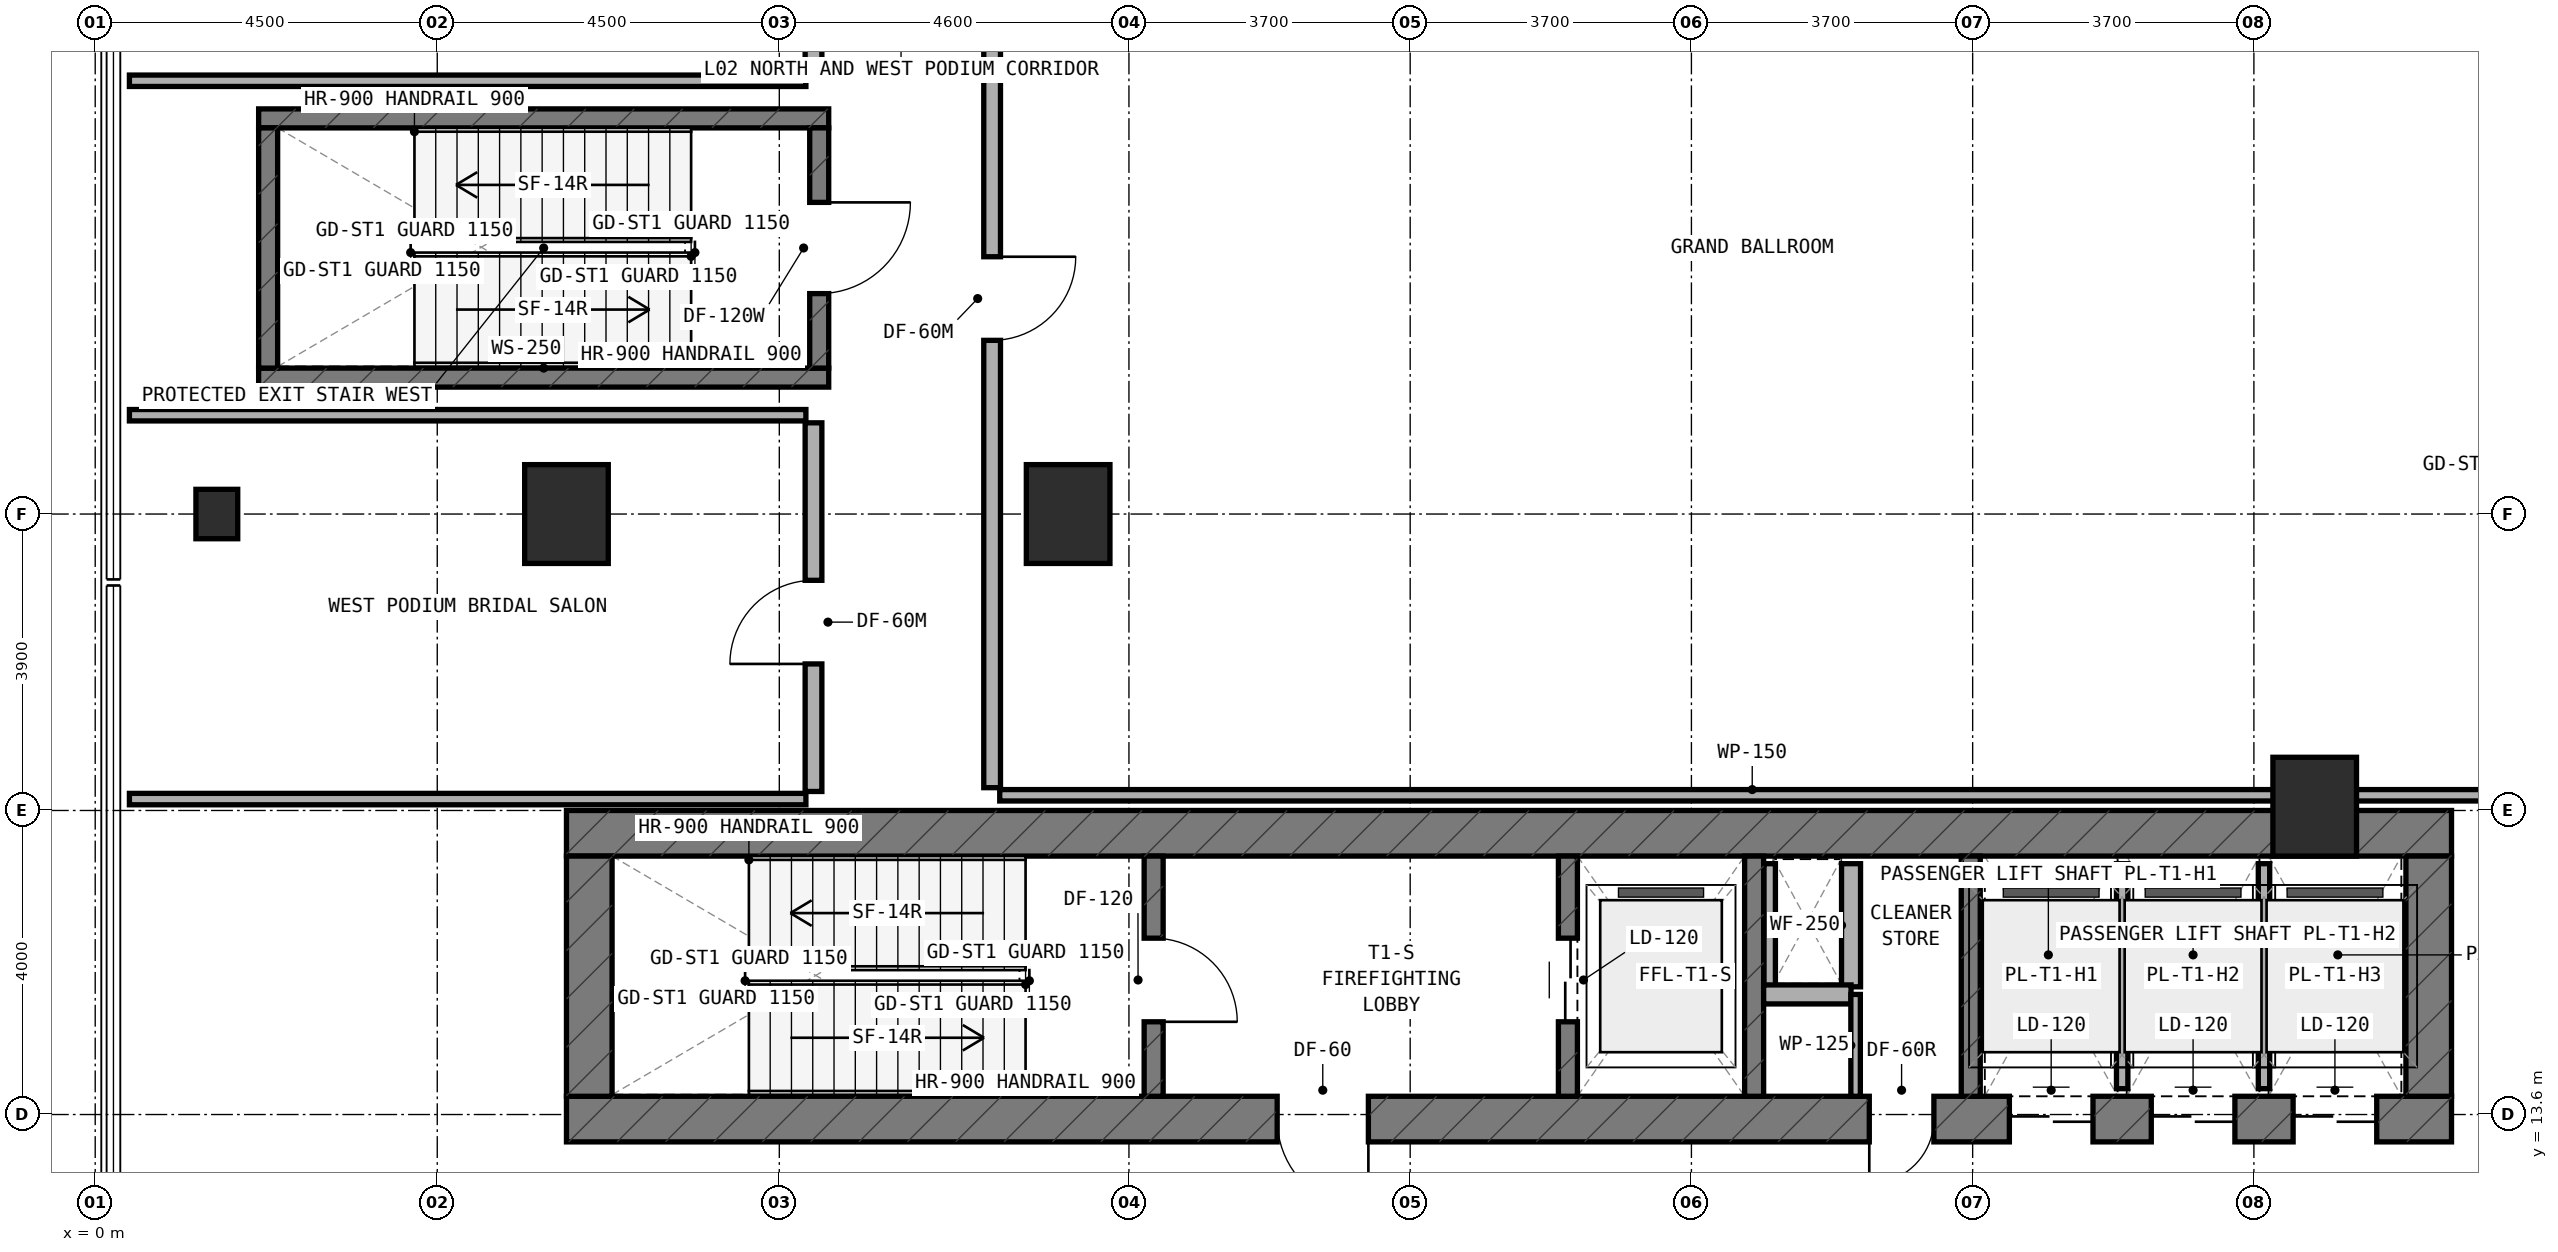
"""IFC4 building model, lengths in metres.
Left out: names, types, materials, properties, quantities, classifications, styles, units other than length and angle.
Written with IfcOpenShell. Run it as: python <this file> out.ifc"""

import sys

from ifc_helpers import new_model, si_unit, direction, frame, frame_2d, origin, origin_2d, place, context, subcontext, project, spatial, rectangle, extrude, element, fill, save


model = new_model("IFC4")
c1 = context("Model", 3, precision=1e-05, world=origin(), true_north=direction((0.0, 1.0)))
c2 = subcontext(c1, "Body", "Model", "MODEL_VIEW")
j1 = project(units=[si_unit("LENGTHUNIT", "METRE"), si_unit("PLANEANGLEUNIT", "RADIAN")], contexts=[c1])
p1 = place(None, origin())
s1 = spatial("IfcSite", under=j1, at=p1, CompositionType="ELEMENT")
p2 = place(p1, origin())
s2 = spatial("IfcBuilding", under=s1, at=p2, CompositionType="ELEMENT")
p3 = place(p2, frame((0.0, 0.0, 10.2)))
s3 = spatial("IfcBuildingStorey", under=s2, at=p3, CompositionType="ELEMENT", Elevation=10.2)
p4 = place(p3, frame((6.2, 13.54, 0.0), z_axis=(0.0, 0.0, 1.0), x_axis=(1.0, 0.0, 0.0)))
e1 = element("IfcWall", 1, at=p4, inside=s3, PredefinedType="SHEAR", context=c2, shape_type="SweptSolid", body=[
    extrude(rectangle(XDim=24.8, YDim=0.6, at=frame_2d((12.4, 0.0))), origin(), (0.0, 0.0, 1.0), 4.8),
])
p5 = place(p4, frame((9.35, 0.0, 0.0)))
e2 = element("IfcOpeningElement", 2, at=p5, cuts=e1, PredefinedType="OPENING", context=c2, shape_type="SweptSolid", body=[
    extrude(rectangle(XDim=1.2, YDim=2.15, at=frame_2d((0.6, 1.075))), frame((0.0, 0.31, 0.0), z_axis=(0.0, -1.0, 0.0), x_axis=(1.0, 0.0, 0.0)), (0.0, 0.0, 1.0), 0.62),
])
p6 = place(p4, frame((17.14, 0.0, 0.0)))
e3 = element("IfcOpeningElement", 3, at=p6, cuts=e1, PredefinedType="OPENING", context=c2, shape_type="SweptSolid", body=[
    extrude(rectangle(XDim=0.85, YDim=2.1, at=frame_2d((0.425, 1.05))), frame((0.0, 0.31, 0.0), z_axis=(0.0, -1.0, 0.0), x_axis=(1.0, 0.0, 0.0)), (0.0, 0.0, 1.0), 0.62),
])
p7 = place(p4, frame((18.983, 0.0, 0.0)))
e4 = element("IfcOpeningElement", 4, at=p7, cuts=e1, PredefinedType="OPENING", context=c2, shape_type="SweptSolid", body=[
    extrude(rectangle(XDim=1.1, YDim=2.15, at=frame_2d((0.55, 1.075))), frame((0.0, 0.31, 0.0), z_axis=(0.0, -1.0, 0.0), x_axis=(1.0, 0.0, 0.0)), (0.0, 0.0, 1.0), 0.62),
])
p8 = place(p4, frame((20.85, 0.0, 0.0)))
e5 = element("IfcOpeningElement", 5, at=p8, cuts=e1, PredefinedType="OPENING", context=c2, shape_type="SweptSolid", body=[
    extrude(rectangle(XDim=1.1, YDim=2.15, at=frame_2d((0.55, 1.075))), frame((0.0, 0.31, 0.0), z_axis=(0.0, -1.0, 0.0), x_axis=(1.0, 0.0, 0.0)), (0.0, 0.0, 1.0), 0.62),
])
p9 = place(p4, frame((22.716, 0.0, 0.0)))
e6 = element("IfcOpeningElement", 6, at=p9, cuts=e1, PredefinedType="OPENING", context=c2, shape_type="SweptSolid", body=[
    extrude(rectangle(XDim=1.1, YDim=2.15, at=frame_2d((0.55, 1.075))), frame((0.0, 0.31, 0.0), z_axis=(0.0, -1.0, 0.0), x_axis=(1.0, 0.0, 0.0)), (0.0, 0.0, 1.0), 0.62),
])
p10 = place(p3, frame((6.2, 17.3, 0.0), z_axis=(0.0, 0.0, 1.0), x_axis=(1.0, 0.0, 0.0)))
e7 = element("IfcWall", 7, at=p10, inside=s3, PredefinedType="SHEAR", context=c2, shape_type="SweptSolid", body=[
    extrude(rectangle(XDim=24.8, YDim=0.6, at=frame_2d((12.4, 0.0))), origin(), (0.0, 0.0, 1.0), 4.8),
])
for number, where, z_axis, x_axis in (
    (8, (6.5, 13.84, 0.0), (0.0, 0.0, 1.0), (0.0, 1.0, 0.0)),
    (9, (30.7, 13.84, 0.0), (0.0, 0.0, 1.0), (0.0, 1.0, 0.0)),
):
    element("IfcWall", number, at=place(p3, frame(where, z_axis=z_axis, x_axis=x_axis)), inside=s3, PredefinedType="SHEAR", context=c2, shape_type="SweptSolid", body=[
        extrude(rectangle(XDim=3.16, YDim=0.6, at=frame_2d((1.58, 0.0))), origin(), (0.0, 0.0, 1.0), 4.8),
    ])
p11 = place(p3, frame((13.925, 13.84, 0.0), z_axis=(0.0, 0.0, 1.0), x_axis=(0.0, 1.0, 0.0)))
e10 = element("IfcWall", 10, at=p11, inside=s3, PredefinedType="STANDARD", context=c2, shape_type="SweptSolid", body=[
    extrude(rectangle(XDim=3.16, YDim=0.25, at=frame_2d((1.58, 0.0))), origin(), (0.0, 0.0, 1.0), 4.45),
])
p12 = place(p11, frame((0.98, 0.0, 0.0)))
e11 = element("IfcOpeningElement", 11, at=p12, cuts=e10, PredefinedType="OPENING", context=c2, shape_type="SweptSolid", body=[
    extrude(rectangle(XDim=1.1, YDim=2.15, at=frame_2d((0.55, 1.075))), frame((0.0, 0.135, 0.0), z_axis=(0.0, -1.0, 0.0), x_axis=(1.0, 0.0, 0.0)), (0.0, 0.0, 1.0), 0.27),
])
p13 = place(p3, frame((19.375, 13.84, 0.0), z_axis=(0.0, 0.0, 1.0), x_axis=(0.0, 1.0, 0.0)))
e12 = element("IfcWall", 12, at=p13, inside=s3, PredefinedType="STANDARD", context=c2, shape_type="SweptSolid", body=[
    extrude(rectangle(XDim=3.16, YDim=0.25, at=frame_2d((1.58, 0.0))), origin(), (0.0, 0.0, 1.0), 4.45),
])
p14 = place(p13, frame((0.98, 0.0, 0.0)))
e13 = element("IfcOpeningElement", 13, at=p14, cuts=e12, PredefinedType="OPENING", context=c2, shape_type="SweptSolid", body=[
    extrude(rectangle(XDim=1.1, YDim=2.15, at=frame_2d((0.55, 1.075))), frame((0.0, 0.135, 0.0), z_axis=(0.0, -1.0, 0.0), x_axis=(1.0, 0.0, 0.0)), (0.0, 0.0, 1.0), 0.27),
])
for number, where, z_axis, x_axis in (
    (14, (21.825, 13.84, 0.0), (0.0, 0.0, 1.0), (0.0, 1.0, 0.0)),
    (15, (24.675, 13.84, 0.0), (0.0, 0.0, 1.0), (0.0, 1.0, 0.0)),
):
    element("IfcWall", number, at=place(p3, frame(where, z_axis=z_axis, x_axis=x_axis)), inside=s3, PredefinedType="STANDARD", context=c2, shape_type="SweptSolid", body=[
        extrude(rectangle(XDim=3.16, YDim=0.25, at=frame_2d((1.58, 0.0))), origin(), (0.0, 0.0, 1.0), 4.45),
    ])
for number, where, z_axis, x_axis in (
    (16, (2.15, 23.295, 0.0), (0.0, 0.0, 1.0), (1.0, 0.0, 0.0)),
    (17, (2.15, 26.705, 0.0), (0.0, 0.0, 1.0), (1.0, 0.0, 0.0)),
):
    element("IfcWall", number, at=place(p3, frame(where, z_axis=z_axis, x_axis=x_axis)), inside=s3, PredefinedType="STANDARD", context=c2, shape_type="SweptSolid", body=[
        extrude(rectangle(XDim=7.5, YDim=0.25, at=frame_2d((3.75, 0.0))), origin(), (0.0, 0.0, 1.0), 4.8),
    ])
p15 = place(p3, frame((2.275, 23.42, 0.0), z_axis=(0.0, 0.0, 1.0), x_axis=(0.0, 1.0, 0.0)))
e18 = element("IfcWall", 18, at=p15, inside=s3, PredefinedType="STANDARD", context=c2, shape_type="SweptSolid", body=[
    extrude(rectangle(XDim=3.16, YDim=0.25, at=frame_2d((1.58, 0.0))), origin(), (0.0, 0.0, 1.0), 4.8),
])
p16 = place(p3, frame((9.525, 23.42, 0.0), z_axis=(0.0, 0.0, 1.0), x_axis=(0.0, 1.0, 0.0)))
e19 = element("IfcWall", 19, at=p16, inside=s3, PredefinedType="STANDARD", context=c2, shape_type="SweptSolid", body=[
    extrude(rectangle(XDim=3.16, YDim=0.25, at=frame_2d((1.58, 0.0))), origin(), (0.0, 0.0, 1.0), 4.8),
])
p17 = place(p16, frame((0.98, 0.0, 0.0)))
e20 = element("IfcOpeningElement", 20, at=p17, cuts=e19, PredefinedType="OPENING", context=c2, shape_type="SweptSolid", body=[
    extrude(rectangle(XDim=1.2, YDim=2.15, at=frame_2d((0.6, 1.075))), frame((0.0, 0.135, 0.0), z_axis=(0.0, -1.0, 0.0), x_axis=(1.0, 0.0, 0.0)), (0.0, 0.0, 1.0), 0.27),
])
for number, where, z_axis, x_axis in (
    (21, (6.2, 21.5, 0.0), (0.0, 0.0, 1.0), (1.0, 0.0, 0.0)),
    (22, (12.8, 21.5, 0.0), (0.0, 0.0, 1.0), (1.0, 0.0, 0.0)),
    (23, (29.2, 17.65, 0.0), (0.0, 0.0, 1.0), (1.0, 0.0, 0.0)),
):
    element("IfcColumn", number, at=place(p3, frame(where, z_axis=z_axis, x_axis=x_axis)), inside=s3, PredefinedType="COLUMN", context=c2, shape_type="SweptSolid", body=[
        extrude(rectangle(XDim=1.1, YDim=1.3, at=origin_2d()), origin(), (0.0, 0.0, 1.0), 4.8),
    ])
p18 = place(p3, frame((1.6, 21.5, 0.0), z_axis=(0.0, 0.0, 1.0), x_axis=(1.0, 0.0, 0.0)))
e24 = element("IfcColumn", 24, at=p18, inside=s3, PredefinedType="PILASTER", context=c2, shape_type="SweptSolid", body=[
    extrude(rectangle(XDim=0.55, YDim=0.65, at=origin_2d()), origin(), (0.0, 0.0, 1.0), 4.8),
])
p19 = place(p3, frame((22.03, 15.28, 0.0), z_axis=(0.0, 0.0, 1.0), x_axis=(0.0, 1.0, 0.0)))
e25 = element("IfcWall", 25, at=p19, inside=s3, PredefinedType="PARTITIONING", context=c2, shape_type="SweptSolid", body=[
    extrude(rectangle(XDim=1.62, YDim=0.15, at=frame_2d((0.81, 0.0))), origin(), (0.0, 0.0, 1.0), 4.45),
])
p20 = place(p3, frame((23.1, 15.28, 0.0), z_axis=(0.0, 0.0, 1.0), x_axis=(0.0, 1.0, 0.0)))
e26 = element("IfcWall", 26, at=p20, inside=s3, PredefinedType="SOLIDWALL", context=c2, shape_type="SweptSolid", body=[
    extrude(rectangle(XDim=1.62, YDim=0.25, at=frame_2d((0.81, 0.0))), origin(), (0.0, 0.0, 1.0), 4.45),
])
p21 = place(p3, frame((21.95, 15.18, 0.0), z_axis=(0.0, 0.0, 1.0), x_axis=(1.0, 0.0, 0.0)))
e27 = element("IfcWall", 27, at=p21, inside=s3, PredefinedType="SOLIDWALL", context=c2, shape_type="SweptSolid", body=[
    extrude(rectangle(XDim=1.15, YDim=0.25, at=frame_2d((0.575, 0.0))), origin(), (0.0, 0.0, 1.0), 4.45),
])
p22 = place(p3, frame((23.16, 13.84, 0.0), z_axis=(0.0, 0.0, 1.0), x_axis=(0.0, 1.0, 0.0)))
e28 = element("IfcWall", 28, at=p22, inside=s3, PredefinedType="PARTITIONING", context=c2, shape_type="SweptSolid", body=[
    extrude(rectangle(XDim=1.34, YDim=0.125, at=frame_2d((0.67, 0.0))), origin(), (0.0, 0.0, 1.0), 4.45),
])
p23 = place(p3, frame((26.667, 13.94, 0.0), z_axis=(0.0, 0.0, 1.0), x_axis=(0.0, 1.0, 0.0)))
e29 = element("IfcWall", 29, at=p23, inside=s3, PredefinedType="PARTITIONING", context=c2, shape_type="SweptSolid", body=[
    extrude(rectangle(XDim=2.96, YDim=0.15, at=frame_2d((1.48, 0.0))), origin(), (0.0, 0.0, 1.0), 4.45),
])
p24 = place(p3, frame((28.533, 13.94, 0.0), z_axis=(0.0, 0.0, 1.0), x_axis=(0.0, 1.0, 0.0)))
e30 = element("IfcWall", 30, at=p24, inside=s3, PredefinedType="PARTITIONING", context=c2, shape_type="SweptSolid", body=[
    extrude(rectangle(XDim=2.96, YDim=0.15, at=frame_2d((1.48, 0.0))), origin(), (0.0, 0.0, 1.0), 3.525),
])
p25 = place(p3, frame((11.9, 17.8, 0.0), z_axis=(0.0, 0.0, 1.0), x_axis=(1.0, 0.0, 0.0)))
e31 = element("IfcWall", 31, at=p25, inside=s3, PredefinedType="PARTITIONING", context=c2, shape_type="SweptSolid", body=[
    extrude(rectangle(XDim=19.8, YDim=0.15, at=frame_2d((9.9, 0.0))), origin(), (0.0, 0.0, 1.0), 3.525),
])
p26 = place(p3, frame((11.8, 17.9, 0.0), z_axis=(0.0, 0.0, 1.0), x_axis=(0.0, 1.0, 0.0)))
e32 = element("IfcWall", 32, at=p26, inside=s3, PredefinedType="SOLIDWALL", context=c2, shape_type="SweptSolid", body=[
    extrude(rectangle(XDim=14.2, YDim=0.22, at=frame_2d((7.1, 0.0))), origin(), (0.0, 0.0, 1.0), 3.525),
])
p27 = place(p26, frame((5.885, 0.0, 0.0)))
e33 = element("IfcOpeningElement", 33, at=p27, cuts=e32, PredefinedType="OPENING", context=c2, shape_type="SweptSolid", body=[
    extrude(rectangle(XDim=1.1, YDim=2.1, at=frame_2d((0.55, 1.05))), frame((0.0, 0.12, 0.0), z_axis=(0.0, -1.0, 0.0), x_axis=(1.0, 0.0, 0.0)), (0.0, 0.0, 1.0), 0.24),
])
p28 = place(p3, frame((0.45, 17.75, 0.0), z_axis=(0.0, 0.0, 1.0), x_axis=(1.0, 0.0, 0.0)))
e34 = element("IfcWall", 34, at=p28, inside=s3, PredefinedType="PARTITIONING", context=c2, shape_type="SweptSolid", body=[
    extrude(rectangle(XDim=8.9, YDim=0.15, at=frame_2d((4.45, 0.0))), origin(), (0.0, 0.0, 1.0), 3.725),
])
p29 = place(p3, frame((0.45, 22.8, 0.0), z_axis=(0.0, 0.0, 1.0), x_axis=(1.0, 0.0, 0.0)))
e35 = element("IfcWall", 35, at=p29, inside=s3, PredefinedType="PARTITIONING", context=c2, shape_type="SweptSolid", body=[
    extrude(rectangle(XDim=8.9, YDim=0.15, at=frame_2d((4.45, 0.0))), origin(), (0.0, 0.0, 1.0), 3.925),
])
p30 = place(p3, frame((9.45, 17.85, 0.0), z_axis=(0.0, 0.0, 1.0), x_axis=(0.0, 1.0, 0.0)))
e36 = element("IfcWall", 36, at=p30, inside=s3, PredefinedType="SOLIDWALL", context=c2, shape_type="SweptSolid", body=[
    extrude(rectangle(XDim=4.85, YDim=0.22, at=frame_2d((2.425, 0.0))), origin(), (0.0, 0.0, 1.0), 3.525),
])
p31 = place(p30, frame((1.678, 0.0, 0.0)))
e37 = element("IfcOpeningElement", 37, at=p31, cuts=e36, PredefinedType="OPENING", context=c2, shape_type="SweptSolid", body=[
    extrude(rectangle(XDim=1.1, YDim=2.1, at=frame_2d((0.55, 1.05))), frame((0.0, 0.12, 0.0), z_axis=(0.0, -1.0, 0.0), x_axis=(1.0, 0.0, 0.0)), (0.0, 0.0, 1.0), 0.24),
])
p32 = place(p3, frame((0.45, 27.2, 0.0), z_axis=(0.0, 0.0, 1.0), x_axis=(1.0, 0.0, 0.0)))
e38 = element("IfcWall", 38, at=p32, inside=s3, PredefinedType="PARTITIONING", context=c2, shape_type="SweptSolid", body=[
    extrude(rectangle(XDim=8.9, YDim=0.15, at=frame_2d((4.45, 0.0))), origin(), (0.0, 0.0, 1.0), 3.925),
])
p33 = place(p3, frame((9.45, 27.3, 0.0), z_axis=(0.0, 0.0, 1.0), x_axis=(0.0, 1.0, 0.0)))
e39 = element("IfcWall", 39, at=p33, inside=s3, PredefinedType="SOLIDWALL", context=c2, shape_type="SweptSolid", body=[
    extrude(rectangle(XDim=4.85, YDim=0.22, at=frame_2d((2.425, 0.0))), origin(), (0.0, 0.0, 1.0), 3.525),
])
p34 = place(p33, frame((1.678, 0.0, 0.0)))
e40 = element("IfcOpeningElement", 40, at=p34, cuts=e39, PredefinedType="OPENING", context=c2, shape_type="SweptSolid", body=[
    extrude(rectangle(XDim=1.1, YDim=2.1, at=frame_2d((0.55, 1.05))), frame((0.0, 0.12, 0.0), z_axis=(0.0, -1.0, 0.0), x_axis=(1.0, 0.0, 0.0)), (0.0, 0.0, 1.0), 0.24),
])
p35 = place(p12, frame((1.1, 0.0, 0.0), z_axis=(0.0, 0.0, 1.0), x_axis=(-1.0, 0.0, 0.0)))
e41 = element("IfcDoor", 41, at=p35, inside=s3, OperationType="SINGLE_SWING_RIGHT", PredefinedType="DOOR", context=c2, shape_type="SweptSolid", body=[
    extrude(rectangle(XDim=1.1, YDim=2.15, at=frame_2d((0.55, 1.075))), frame((0.0, 0.025, 0.0), z_axis=(0.0, -1.0, 0.0), x_axis=(1.0, 0.0, 0.0)), (0.0, 0.0, 1.0), 0.05),
])
fill(e11, e41)
p36 = place(p5, frame((1.2, 0.0, 0.0), z_axis=(0.0, 0.0, 1.0), x_axis=(-1.0, 0.0, 0.0)))
e42 = element("IfcDoor", 42, at=p36, inside=s3, OperationType="SINGLE_SWING_LEFT", PredefinedType="DOOR", context=c2, shape_type="SweptSolid", body=[
    extrude(rectangle(XDim=1.2, YDim=2.15, at=frame_2d((0.6, 1.075))), frame((0.0, 0.025, 0.0), z_axis=(0.0, -1.0, 0.0), x_axis=(1.0, 0.0, 0.0)), (0.0, 0.0, 1.0), 0.05),
])
fill(e2, e42)
p37 = place(p14, origin())
e43 = element("IfcDoor", 43, at=p37, inside=s3, OperationType="DOUBLE_DOOR_SLIDING", PredefinedType="DOOR", context=c2, shape_type="SweptSolid", body=[
    extrude(rectangle(XDim=1.1, YDim=2.15, at=frame_2d((0.55, 1.075))), frame((0.0, 0.025, 0.0), z_axis=(0.0, -1.0, 0.0), x_axis=(1.0, 0.0, 0.0)), (0.0, 0.0, 1.0), 0.05),
])
fill(e13, e43)
p38 = place(p6, frame((0.85, 0.0, 0.0), z_axis=(0.0, 0.0, 1.0), x_axis=(-1.0, 0.0, 0.0)))
e44 = element("IfcDoor", 44, at=p38, inside=s3, OperationType="SINGLE_SWING_RIGHT", PredefinedType="DOOR", context=c2, shape_type="SweptSolid", body=[
    extrude(rectangle(XDim=0.85, YDim=2.1, at=frame_2d((0.425, 1.05))), frame((0.0, 0.025, 0.0), z_axis=(0.0, -1.0, 0.0), x_axis=(1.0, 0.0, 0.0)), (0.0, 0.0, 1.0), 0.05),
])
fill(e3, e44)
p39 = place(p7, frame((1.1, 0.0, 0.0), z_axis=(0.0, 0.0, 1.0), x_axis=(-1.0, 0.0, 0.0)))
e45 = element("IfcDoor", 45, at=p39, inside=s3, OperationType="DOUBLE_DOOR_SLIDING", PredefinedType="DOOR", context=c2, shape_type="SweptSolid", body=[
    extrude(rectangle(XDim=1.1, YDim=2.15, at=frame_2d((0.55, 1.075))), frame((0.0, 0.025, 0.0), z_axis=(0.0, -1.0, 0.0), x_axis=(1.0, 0.0, 0.0)), (0.0, 0.0, 1.0), 0.05),
])
fill(e4, e45)
p40 = place(p8, frame((1.1, 0.0, 0.0), z_axis=(0.0, 0.0, 1.0), x_axis=(-1.0, 0.0, 0.0)))
e46 = element("IfcDoor", 46, at=p40, inside=s3, OperationType="DOUBLE_DOOR_SLIDING", PredefinedType="DOOR", context=c2, shape_type="SweptSolid", body=[
    extrude(rectangle(XDim=1.1, YDim=2.15, at=frame_2d((0.55, 1.075))), frame((0.0, 0.025, 0.0), z_axis=(0.0, -1.0, 0.0), x_axis=(1.0, 0.0, 0.0)), (0.0, 0.0, 1.0), 0.05),
])
fill(e5, e46)
p41 = place(p9, frame((1.1, 0.0, 0.0), z_axis=(0.0, 0.0, 1.0), x_axis=(-1.0, 0.0, 0.0)))
e47 = element("IfcDoor", 47, at=p41, inside=s3, OperationType="DOUBLE_DOOR_SLIDING", PredefinedType="DOOR", context=c2, shape_type="SweptSolid", body=[
    extrude(rectangle(XDim=1.1, YDim=2.15, at=frame_2d((0.55, 1.075))), frame((0.0, 0.025, 0.0), z_axis=(0.0, -1.0, 0.0), x_axis=(1.0, 0.0, 0.0)), (0.0, 0.0, 1.0), 0.05),
])
fill(e6, e47)
p42 = place(p17, frame((1.2, 0.0, 0.0), z_axis=(0.0, 0.0, 1.0), x_axis=(-1.0, 0.0, 0.0)))
e48 = element("IfcDoor", 48, at=p42, inside=s3, OperationType="SINGLE_SWING_LEFT", PredefinedType="DOOR", context=c2, shape_type="SweptSolid", body=[
    extrude(rectangle(XDim=1.2, YDim=2.15, at=frame_2d((0.6, 1.075))), frame((0.0, 0.025, 0.0), z_axis=(0.0, -1.0, 0.0), x_axis=(1.0, 0.0, 0.0)), (0.0, 0.0, 1.0), 0.05),
])
fill(e20, e48)
p43 = place(p27, frame((1.1, 0.0, 0.0), z_axis=(0.0, 0.0, 1.0), x_axis=(-1.0, 0.0, 0.0)))
e49 = element("IfcDoor", 49, at=p43, inside=s3, OperationType="SINGLE_SWING_LEFT", PredefinedType="DOOR", context=c2, shape_type="SweptSolid", body=[
    extrude(rectangle(XDim=1.1, YDim=2.1, at=frame_2d((0.55, 1.05))), frame((0.0, 0.025, 0.0), z_axis=(0.0, -1.0, 0.0), x_axis=(1.0, 0.0, 0.0)), (0.0, 0.0, 1.0), 0.05),
])
fill(e33, e49)
p44 = place(p31, origin())
e50 = element("IfcDoor", 50, at=p44, inside=s3, OperationType="SINGLE_SWING_LEFT", PredefinedType="DOOR", context=c2, shape_type="SweptSolid", body=[
    extrude(rectangle(XDim=1.1, YDim=2.1, at=frame_2d((0.55, 1.05))), frame((0.0, 0.025, 0.0), z_axis=(0.0, -1.0, 0.0), x_axis=(1.0, 0.0, 0.0)), (0.0, 0.0, 1.0), 0.05),
])
fill(e37, e50)
save(model, sys.argv[1])
